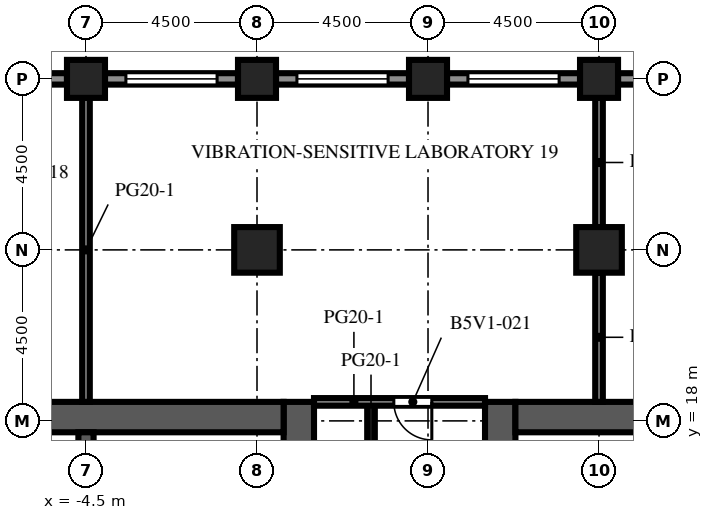
"""IFC4 building model, lengths in metres.
Left out: names, types, materials, properties, quantities, classifications, styles, units other than length and angle.
Written with IfcOpenShell. Run it as: python <this file> out.ifc"""

import sys

from ifc_helpers import new_model, si_unit, direction, frame, frame_2d, origin, origin_2d, place, context, subcontext, project, spatial, rectangle, extrude, element, fill, save


model = new_model("IFC4")
c1 = context("Model", 3, precision=1e-05, world=origin(), true_north=direction((0.0, 1.0)))
c2 = subcontext(c1, "Body", "Model", "MODEL_VIEW")
j1 = project(units=[si_unit("LENGTHUNIT", "METRE"), si_unit("PLANEANGLEUNIT", "RADIAN")], contexts=[c1])
p1 = place(None, origin())
s1 = spatial("IfcSite", under=j1, at=p1, CompositionType="ELEMENT")
p2 = place(p1, origin())
s2 = spatial("IfcBuilding", under=s1, at=p2, CompositionType="ELEMENT")
p3 = place(p2, frame((0.0, 0.0, 165.0)))
s3 = spatial("IfcBuildingStorey", under=s2, at=p3, CompositionType="ELEMENT", Elevation=165.0)
for number, where, z_axis, x_axis in (
    (1, (-4.5, 27.0, 0.0), (0.0, 0.0, 1.0), (1.0, 0.0, 0.0)),
    (2, (0.0, 27.0, 0.0), (0.0, 0.0, 1.0), (1.0, 0.0, 0.0)),
    (3, (4.5, 27.0, 0.0), (0.0, 0.0, 1.0), (1.0, 0.0, 0.0)),
    (4, (9.0, 27.0, 0.0), (0.0, 0.0, 1.0), (1.0, 0.0, 0.0)),
):
    element("IfcColumn", number, at=place(p3, frame(where, z_axis=z_axis, x_axis=x_axis)), inside=s3, PredefinedType="COLUMN", context=c2, shape_type="SweptSolid", body=[
        extrude(rectangle(XDim=1.0, YDim=1.0, at=origin_2d()), origin(), (0.0, 0.0, 1.0), 4.1),
    ])
for number, where, z_axis, x_axis in (
    (5, (0.0, 22.5, 0.0), (0.0, 0.0, 1.0), (1.0, 0.0, 0.0)),
    (6, (9.0, 22.5, 0.0), (0.0, 0.0, 1.0), (1.0, 0.0, 0.0)),
):
    element("IfcColumn", number, at=place(p3, frame(where, z_axis=z_axis, x_axis=x_axis)), inside=s3, PredefinedType="COLUMN", context=c2, shape_type="SweptSolid", body=[
        extrude(rectangle(XDim=1.2, YDim=1.2, at=origin_2d()), origin(), (0.0, 0.0, 1.0), 4.1),
    ])
p4 = place(p3, frame((1.1, -9.0, 0.0), z_axis=(0.0, 0.0, 1.0), x_axis=(0.0, 1.0, 0.0)))
e7 = element("IfcWall", 7, at=p4, inside=s3, PredefinedType="SHEAR", context=c2, shape_type="SweptSolid", body=[
    extrude(rectangle(XDim=27.5, YDim=0.8, at=frame_2d((13.75, 0.0))), origin(), (0.0, 0.0, 1.0), 4.1),
])
p5 = place(p4, frame((12.55, 0.0, 0.0)))
e8 = element("IfcOpeningElement", 8, at=p5, cuts=e7, PredefinedType="OPENING", context=c2, shape_type="SweptSolid", body=[
    extrude(rectangle(XDim=2.4, YDim=2.4, at=frame_2d((1.2, 1.2))), frame((0.0, 0.41, 0.0), z_axis=(0.0, -1.0, 0.0), x_axis=(1.0, 0.0, 0.0)), (0.0, 0.0, 1.0), 0.82),
])
p6 = place(p4, frame((3.95, 0.0, 0.0)))
e9 = element("IfcOpeningElement", 9, at=p6, cuts=e7, PredefinedType="OPENING", context=c2, shape_type="SweptSolid", body=[
    extrude(rectangle(XDim=1.2, YDim=2.1, at=frame_2d((0.6, 1.05))), frame((0.0, 0.41, 0.0), z_axis=(0.0, -1.0, 0.0), x_axis=(1.0, 0.0, 0.0)), (0.0, 0.0, 1.0), 0.82),
])
p7 = place(p4, frame((22.35, 0.0, 0.0)))
e10 = element("IfcOpeningElement", 10, at=p7, cuts=e7, PredefinedType="OPENING", context=c2, shape_type="SweptSolid", body=[
    extrude(rectangle(XDim=1.2, YDim=2.1, at=frame_2d((0.6, 1.05))), frame((0.0, 0.41, 0.0), z_axis=(0.0, -1.0, 0.0), x_axis=(1.0, 0.0, 0.0)), (0.0, 0.0, 1.0), 0.82),
])
p8 = place(p3, frame((-9.7, 18.1, 0.0), z_axis=(0.0, 0.0, 1.0), x_axis=(1.0, 0.0, 0.0)))
e11 = element("IfcWall", 11, at=p8, inside=s3, PredefinedType="SHEAR", context=c2, shape_type="SweptSolid", body=[
    extrude(rectangle(XDim=10.4, YDim=0.8, at=frame_2d((5.2, 0.0))), origin(), (0.0, 0.0, 1.0), 4.1),
])
p9 = place(p3, frame((-4.5, 10.2, 0.0), z_axis=(0.0, 0.0, 1.0), x_axis=(0.0, 1.0, 0.0)))
e12 = element("IfcWall", 12, at=p9, inside=s3, PredefinedType="SHEAR", context=c2, shape_type="SweptSolid", body=[
    extrude(rectangle(XDim=7.5, YDim=0.4, at=frame_2d((3.75, 0.0))), origin(), (0.0, 0.0, 1.0), 4.1),
])
p10 = place(p3, frame((6.4, -9.0, 0.0), z_axis=(0.0, 0.0, 1.0), x_axis=(0.0, 1.0, 0.0)))
e13 = element("IfcWall", 13, at=p10, inside=s3, PredefinedType="SHEAR", context=c2, shape_type="SweptSolid", body=[
    extrude(rectangle(XDim=27.5, YDim=0.8, at=frame_2d((13.75, 0.0))), origin(), (0.0, 0.0, 1.0), 4.1),
])
p11 = place(p10, frame((12.55, 0.0, 0.0)))
e14 = element("IfcOpeningElement", 14, at=p11, cuts=e13, PredefinedType="OPENING", context=c2, shape_type="SweptSolid", body=[
    extrude(rectangle(XDim=2.4, YDim=2.4, at=frame_2d((1.2, 1.2))), frame((0.0, 0.41, 0.0), z_axis=(0.0, -1.0, 0.0), x_axis=(1.0, 0.0, 0.0)), (0.0, 0.0, 1.0), 0.82),
])
p12 = place(p10, frame((3.95, 0.0, 0.0)))
e15 = element("IfcOpeningElement", 15, at=p12, cuts=e13, PredefinedType="OPENING", context=c2, shape_type="SweptSolid", body=[
    extrude(rectangle(XDim=1.2, YDim=2.1, at=frame_2d((0.6, 1.05))), frame((0.0, 0.41, 0.0), z_axis=(0.0, -1.0, 0.0), x_axis=(1.0, 0.0, 0.0)), (0.0, 0.0, 1.0), 0.82),
])
p13 = place(p10, frame((22.35, 0.0, 0.0)))
e16 = element("IfcOpeningElement", 16, at=p13, cuts=e13, PredefinedType="OPENING", context=c2, shape_type="SweptSolid", body=[
    extrude(rectangle(XDim=1.2, YDim=2.1, at=frame_2d((0.6, 1.05))), frame((0.0, 0.41, 0.0), z_axis=(0.0, -1.0, 0.0), x_axis=(1.0, 0.0, 0.0)), (0.0, 0.0, 1.0), 0.82),
])
p14 = place(p3, frame((6.8, 18.1, 0.0), z_axis=(0.0, 0.0, 1.0), x_axis=(1.0, 0.0, 0.0)))
e17 = element("IfcWall", 17, at=p14, inside=s3, PredefinedType="SHEAR", context=c2, shape_type="SweptSolid", body=[
    extrude(rectangle(XDim=10.4, YDim=0.8, at=frame_2d((5.2, 0.0))), origin(), (0.0, 0.0, 1.0), 4.1),
])
p15 = place(p3, frame((9.5, 27.0, 0.0), z_axis=(0.0, 0.0, 1.0), x_axis=(1.0, 0.0, 0.0)))
e18 = element("IfcWall", 18, at=p15, inside=s3, PredefinedType="SOLIDWALL", context=c2, shape_type="SweptSolid", body=[
    extrude(rectangle(XDim=3.5, YDim=0.3, at=frame_2d((1.75, 0.0))), origin(), (0.0, 0.0, 1.0), 2.85),
])
p16 = place(p15, frame((0.55, 0.0, 0.8)))
e19 = element("IfcOpeningElement", 19, at=p16, cuts=e18, PredefinedType="OPENING", context=c2, shape_type="SweptSolid", body=[
    extrude(rectangle(XDim=2.4, YDim=1.7, at=frame_2d((1.2, 0.85))), frame((0.0, 0.16, 0.0), z_axis=(0.0, -1.0, 0.0), x_axis=(1.0, 0.0, 0.0)), (0.0, 0.0, 1.0), 0.32),
])
p17 = place(p3, frame((5.0, 27.0, 0.0), z_axis=(0.0, 0.0, 1.0), x_axis=(1.0, 0.0, 0.0)))
e20 = element("IfcWall", 20, at=p17, inside=s3, PredefinedType="SOLIDWALL", context=c2, shape_type="SweptSolid", body=[
    extrude(rectangle(XDim=3.5, YDim=0.3, at=frame_2d((1.75, 0.0))), origin(), (0.0, 0.0, 1.0), 2.85),
])
p18 = place(p17, frame((0.55, 0.0, 0.8)))
e21 = element("IfcOpeningElement", 21, at=p18, cuts=e20, PredefinedType="OPENING", context=c2, shape_type="SweptSolid", body=[
    extrude(rectangle(XDim=2.4, YDim=1.7, at=frame_2d((1.2, 0.85))), frame((0.0, 0.16, 0.0), z_axis=(0.0, -1.0, 0.0), x_axis=(1.0, 0.0, 0.0)), (0.0, 0.0, 1.0), 0.32),
])
p19 = place(p3, frame((0.5, 27.0, 0.0), z_axis=(0.0, 0.0, 1.0), x_axis=(1.0, 0.0, 0.0)))
e22 = element("IfcWall", 22, at=p19, inside=s3, PredefinedType="SOLIDWALL", context=c2, shape_type="SweptSolid", body=[
    extrude(rectangle(XDim=3.5, YDim=0.3, at=frame_2d((1.75, 0.0))), origin(), (0.0, 0.0, 1.0), 2.85),
])
p20 = place(p19, frame((0.55, 0.0, 0.8)))
e23 = element("IfcOpeningElement", 23, at=p20, cuts=e22, PredefinedType="OPENING", context=c2, shape_type="SweptSolid", body=[
    extrude(rectangle(XDim=2.4, YDim=1.7, at=frame_2d((1.2, 0.85))), frame((0.0, 0.16, 0.0), z_axis=(0.0, -1.0, 0.0), x_axis=(1.0, 0.0, 0.0)), (0.0, 0.0, 1.0), 0.32),
])
p21 = place(p3, frame((-4.0, 27.0, 0.0), z_axis=(0.0, 0.0, 1.0), x_axis=(1.0, 0.0, 0.0)))
e24 = element("IfcWall", 24, at=p21, inside=s3, PredefinedType="SOLIDWALL", context=c2, shape_type="SweptSolid", body=[
    extrude(rectangle(XDim=3.5, YDim=0.3, at=frame_2d((1.75, 0.0))), origin(), (0.0, 0.0, 1.0), 2.85),
])
p22 = place(p21, frame((0.55, 0.0, 0.8)))
e25 = element("IfcOpeningElement", 25, at=p22, cuts=e24, PredefinedType="OPENING", context=c2, shape_type="SweptSolid", body=[
    extrude(rectangle(XDim=2.4, YDim=1.7, at=frame_2d((1.2, 0.85))), frame((0.0, 0.16, 0.0), z_axis=(0.0, -1.0, 0.0), x_axis=(1.0, 0.0, 0.0)), (0.0, 0.0, 1.0), 0.32),
])
p23 = place(p3, frame((-8.5, 27.0, 0.0), z_axis=(0.0, 0.0, 1.0), x_axis=(1.0, 0.0, 0.0)))
e26 = element("IfcWall", 26, at=p23, inside=s3, PredefinedType="SOLIDWALL", context=c2, shape_type="SweptSolid", body=[
    extrude(rectangle(XDim=3.5, YDim=0.3, at=frame_2d((1.75, 0.0))), origin(), (0.0, 0.0, 1.0), 2.85),
])
p24 = place(p23, frame((0.55, 0.0, 0.8)))
e27 = element("IfcOpeningElement", 27, at=p24, cuts=e26, PredefinedType="OPENING", context=c2, shape_type="SweptSolid", body=[
    extrude(rectangle(XDim=2.4, YDim=1.7, at=frame_2d((1.2, 0.85))), frame((0.0, 0.16, 0.0), z_axis=(0.0, -1.0, 0.0), x_axis=(1.0, 0.0, 0.0)), (0.0, 0.0, 1.0), 0.32),
])
p25 = place(p3, frame((-0.7, 14.85, 0.0), z_axis=(0.0, 0.0, 1.0), x_axis=(0.0, 1.0, 0.0)))
e28 = element("IfcWall", 28, at=p25, inside=s3, PredefinedType="PARTITIONING", context=c2, shape_type="SweptSolid", body=[
    extrude(rectangle(XDim=2.85, YDim=0.1, at=frame_2d((1.425, 0.0))), origin(), (0.0, 0.0, 1.0), 3.65),
])
p26 = place(p25, frame((0.925, 0.0, 0.0)))
e29 = element("IfcOpeningElement", 29, at=p26, cuts=e28, PredefinedType="OPENING", context=c2, shape_type="SweptSolid", body=[
    extrude(rectangle(XDim=1.0, YDim=2.1, at=frame_2d((0.5, 1.05))), frame((0.0, 0.06, 0.0), z_axis=(0.0, -1.0, 0.0), x_axis=(1.0, 0.0, 0.0)), (0.0, 0.0, 1.0), 0.12),
])
p27 = place(p3, frame((8.2, 14.85, 0.0), z_axis=(0.0, 0.0, 1.0), x_axis=(0.0, 1.0, 0.0)))
e30 = element("IfcWall", 30, at=p27, inside=s3, PredefinedType="PARTITIONING", context=c2, shape_type="SweptSolid", body=[
    extrude(rectangle(XDim=2.85, YDim=0.1, at=frame_2d((1.425, 0.0))), origin(), (0.0, 0.0, 1.0), 3.65),
])
p28 = place(p27, frame((0.925, 0.0, 0.0)))
e31 = element("IfcOpeningElement", 31, at=p28, cuts=e30, PredefinedType="OPENING", context=c2, shape_type="SweptSolid", body=[
    extrude(rectangle(XDim=1.0, YDim=2.1, at=frame_2d((0.5, 1.05))), frame((0.0, 0.06, 0.0), z_axis=(0.0, -1.0, 0.0), x_axis=(1.0, 0.0, 0.0)), (0.0, 0.0, 1.0), 0.12),
])
p29 = place(p3, frame((-4.5, 18.5, 0.0), z_axis=(0.0, 0.0, 1.0), x_axis=(0.0, 1.0, 0.0)))
e32 = element("IfcWall", 32, at=p29, inside=s3, PredefinedType="PARTITIONING", context=c2, shape_type="SweptSolid", body=[
    extrude(rectangle(XDim=8.0, YDim=0.2, at=frame_2d((4.0, 0.0))), origin(), (0.0, 0.0, 1.0), 3.65),
])
p30 = place(p3, frame((3.0, 6.7, 0.0), z_axis=(0.0, 0.0, 1.0), x_axis=(0.0, 1.0, 0.0)))
e33 = element("IfcWall", 33, at=p30, inside=s3, PredefinedType="PARTITIONING", context=c2, shape_type="SweptSolid", body=[
    extrude(rectangle(XDim=11.8, YDim=0.2, at=frame_2d((5.9, 0.0))), origin(), (0.0, 0.0, 1.0), 3.65),
])
p31 = place(p30, frame((5.35, 0.0, 0.0)))
e34 = element("IfcOpeningElement", 34, at=p31, cuts=e33, PredefinedType="OPENING", context=c2, shape_type="SweptSolid", body=[
    extrude(rectangle(XDim=1.0, YDim=2.1, at=frame_2d((0.5, 1.05))), frame((0.0, 0.11, 0.0), z_axis=(0.0, -1.0, 0.0), x_axis=(1.0, 0.0, 0.0)), (0.0, 0.0, 1.0), 0.22),
])
for number, where, z_axis, x_axis in (
    (35, (9.0, 18.5, 0.0), (0.0, 0.0, 1.0), (0.0, 1.0, 0.0)),
    (36, (9.0, 23.1, 0.0), (0.0, 0.0, 1.0), (0.0, 1.0, 0.0)),
):
    element("IfcWall", number, at=place(p3, frame(where, z_axis=z_axis, x_axis=x_axis)), inside=s3, PredefinedType="PARTITIONING", context=c2, shape_type="SweptSolid", body=[
        extrude(rectangle(XDim=3.4, YDim=0.2, at=frame_2d((1.7, 0.0))), origin(), (0.0, 0.0, 1.0), 3.65),
    ])
p32 = place(p3, frame((1.5, 18.5, 0.0), z_axis=(0.0, 0.0, 1.0), x_axis=(1.0, 0.0, 0.0)))
e37 = element("IfcWall", 37, at=p32, inside=s3, PredefinedType="PARTITIONING", context=c2, shape_type="SweptSolid", body=[
    extrude(rectangle(XDim=4.5, YDim=0.2, at=frame_2d((2.25, 0.0))), origin(), (0.0, 0.0, 1.0), 3.65),
])
p33 = place(p32, frame((2.1, 0.0, 0.0)))
e38 = element("IfcOpeningElement", 38, at=p33, cuts=e37, PredefinedType="OPENING", context=c2, shape_type="SweptSolid", body=[
    extrude(rectangle(XDim=1.0, YDim=2.1, at=frame_2d((0.5, 1.05))), frame((0.0, 0.11, 0.0), z_axis=(0.0, -1.0, 0.0), x_axis=(1.0, 0.0, 0.0)), (0.0, 0.0, 1.0), 0.22),
])
p34 = place(p18, origin())
e39 = element("IfcWindow", 39, at=p34, inside=s3, PartitioningType="SINGLE_PANEL", PredefinedType="WINDOW", context=c2, shape_type="SweptSolid", body=[
    extrude(rectangle(XDim=2.4, YDim=1.7, at=frame_2d((1.2, 0.85))), frame((0.0, 0.03, 0.0), z_axis=(0.0, -1.0, 0.0), x_axis=(1.0, 0.0, 0.0)), (0.0, 0.0, 1.0), 0.06),
])
fill(e21, e39)
p35 = place(p20, origin())
e40 = element("IfcWindow", 40, at=p35, inside=s3, PartitioningType="SINGLE_PANEL", PredefinedType="WINDOW", context=c2, shape_type="SweptSolid", body=[
    extrude(rectangle(XDim=2.4, YDim=1.7, at=frame_2d((1.2, 0.85))), frame((0.0, 0.03, 0.0), z_axis=(0.0, -1.0, 0.0), x_axis=(1.0, 0.0, 0.0)), (0.0, 0.0, 1.0), 0.06),
])
fill(e23, e40)
p36 = place(p22, origin())
e41 = element("IfcWindow", 41, at=p36, inside=s3, PartitioningType="SINGLE_PANEL", PredefinedType="WINDOW", context=c2, shape_type="SweptSolid", body=[
    extrude(rectangle(XDim=2.4, YDim=1.7, at=frame_2d((1.2, 0.85))), frame((0.0, 0.03, 0.0), z_axis=(0.0, -1.0, 0.0), x_axis=(1.0, 0.0, 0.0)), (0.0, 0.0, 1.0), 0.06),
])
fill(e25, e41)
p37 = place(p33, origin())
e42 = element("IfcDoor", 42, at=p37, inside=s3, OperationType="SINGLE_SWING_RIGHT", PredefinedType="DOOR", context=c2, shape_type="SweptSolid", body=[
    extrude(rectangle(XDim=1.0, YDim=2.1, at=frame_2d((0.5, 1.05))), frame((0.0, 0.025, 0.0), z_axis=(0.0, -1.0, 0.0), x_axis=(1.0, 0.0, 0.0)), (0.0, 0.0, 1.0), 0.05),
])
fill(e38, e42)
save(model, sys.argv[1])
